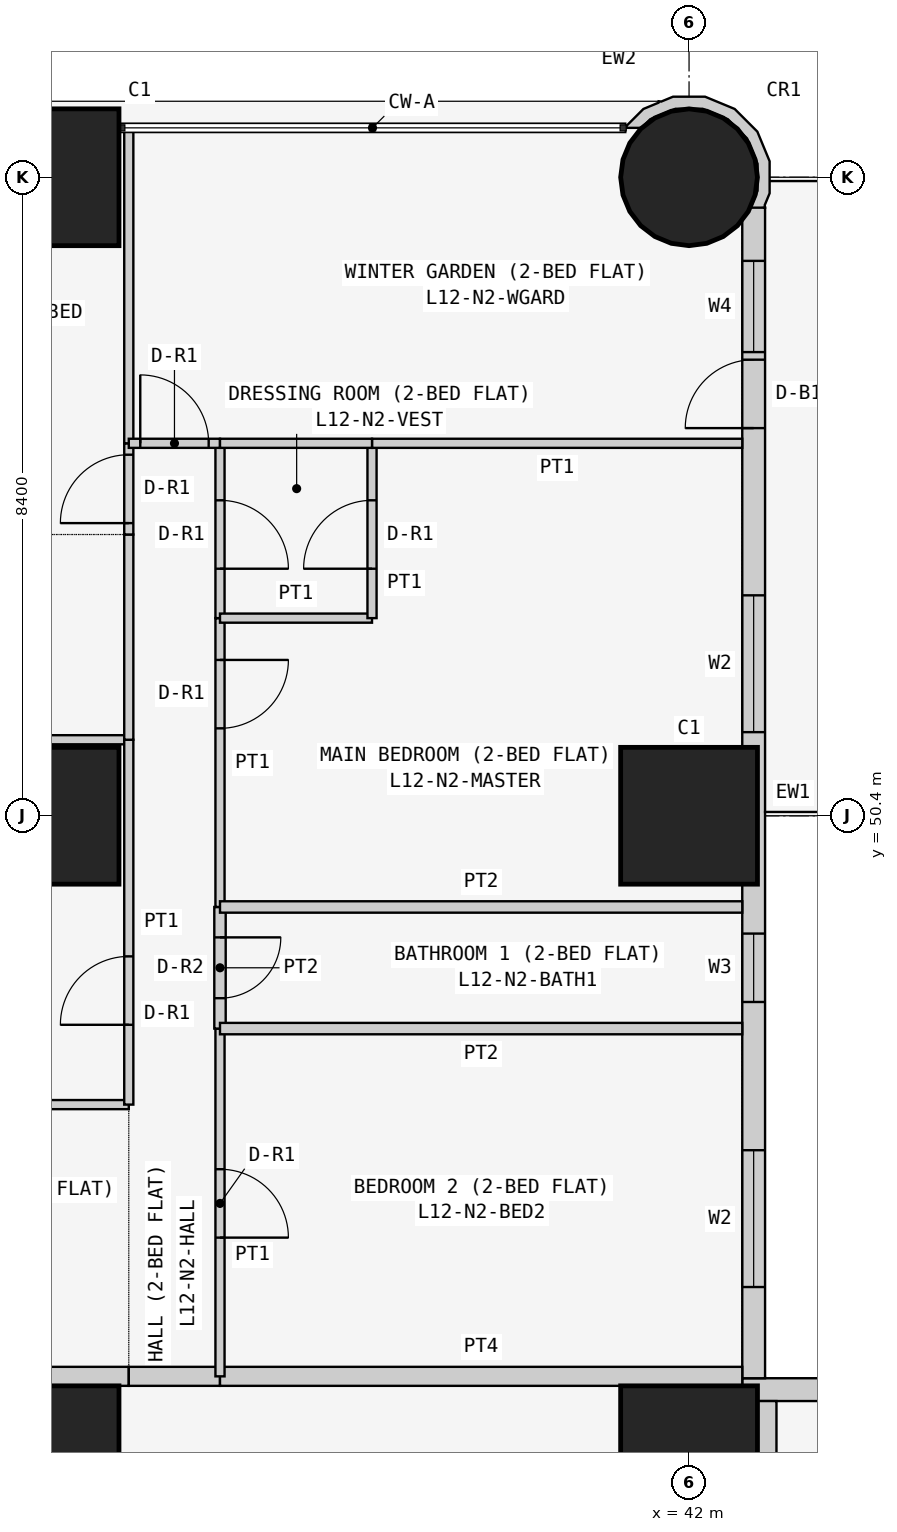
"""IFC4 building model, lengths in metres.
Left out: names, types, materials, properties, quantities, classifications, styles, units other than length and angle.
Written with IfcOpenShell. Run it as: python <this file> out.ifc"""

import sys

from ifc_helpers import new_model, si_unit, direction, frame, frame_2d, origin, origin_2d, place, context, subcontext, project, spatial, polyline, rectangle, circle, outline, extrude, element, fill, save


model = new_model("IFC4")
c1 = context("Model", 3, precision=1e-05, world=origin(), true_north=direction((0.0, 1.0)))
c2 = subcontext(c1, "Body", "Model", "MODEL_VIEW")
j1 = project(units=[si_unit("LENGTHUNIT", "METRE"), si_unit("PLANEANGLEUNIT", "RADIAN")], contexts=[c1])
p1 = place(None, origin())
s1 = spatial("IfcSite", under=j1, at=p1, CompositionType="ELEMENT")
p2 = place(p1, origin())
s2 = spatial("IfcBuilding", under=s1, at=p2, CompositionType="ELEMENT")
p3 = place(p2, frame((0.0, 0.0, 52.5)))
s3 = spatial("IfcBuildingStorey", under=s2, at=p3, CompositionType="ELEMENT", Elevation=52.5)
for number, where, z_axis, x_axis in (
    (1, (33.6, 42.0, 0.0), (0.0, 0.0, 1.0), (1.0, 0.0, 0.0)),
    (2, (33.6, 50.4, 0.0), (0.0, 0.0, 1.0), (1.0, 0.0, 0.0)),
    (3, (33.6, 58.8, 0.0), (0.0, 0.0, 1.0), (1.0, 0.0, 0.0)),
    (4, (42.0, 42.0, 0.0), (0.0, 0.0, 1.0), (1.0, 0.0, 0.0)),
    (5, (42.0, 50.4, 0.0), (0.0, 0.0, 1.0), (1.0, 0.0, 0.0)),
):
    element("IfcColumn", number, at=place(p3, frame(where, z_axis=z_axis, x_axis=x_axis)), inside=s3, PredefinedType="COLUMN", context=c2, shape_type="SweptSolid", body=[
        extrude(rectangle(XDim=1.8, YDim=1.8, at=origin_2d()), origin(), (0.0, 0.0, 1.0), 3.6),
    ])
p4 = place(p3, frame((42.0, 58.8, 0.0), z_axis=(0.0, 0.0, 1.0), x_axis=(1.0, 0.0, 0.0)))
e6 = element("IfcColumn", 6, at=p4, inside=s3, PredefinedType="COLUMN", context=c2, shape_type="SweptSolid", body=[
    extrude(circle(Radius=0.9, at=origin_2d()), origin(), (0.0, 0.0, 1.0), 3.6),
])
p5 = place(p3, frame((58.4, 42.85, 0.0), z_axis=(0.0, 0.0, 1.0), x_axis=(-1.0, 0.0, 0.0)))
e7 = element("IfcWall", 7, at=p5, inside=s3, PredefinedType="SOLIDWALL", context=c2, shape_type="SweptSolid", body=[
    extrude(rectangle(XDim=15.7, YDim=0.3, at=frame_2d((7.85, 0.0))), origin(), (0.0, 0.0, 1.0), 3.45),
])
p6 = place(p5, frame((12.4, 0.0, 0.9)))
e8 = element("IfcOpeningElement", 8, at=p6, cuts=e7, PredefinedType="OPENING", context=c2, shape_type="SweptSolid", body=[
    extrude(rectangle(XDim=1.8, YDim=1.5, at=frame_2d((0.9, 0.75))), frame((0.0, 0.16, 0.0), z_axis=(0.0, -1.0, 0.0), x_axis=(1.0, 0.0, 0.0)), (0.0, 0.0, 1.0), 0.32),
])
p7 = place(p5, frame((9.55, 0.0, 1.5)))
e9 = element("IfcOpeningElement", 9, at=p7, cuts=e7, PredefinedType="OPENING", context=c2, shape_type="SweptSolid", body=[
    extrude(rectangle(XDim=0.9, YDim=0.7, at=frame_2d((0.45, 0.35))), frame((0.0, 0.16, 0.0), z_axis=(0.0, -1.0, 0.0), x_axis=(1.0, 0.0, 0.0)), (0.0, 0.0, 1.0), 0.32),
])
p8 = place(p5, frame((5.1, 0.0, 0.9)))
e10 = element("IfcOpeningElement", 10, at=p8, cuts=e7, PredefinedType="OPENING", context=c2, shape_type="SweptSolid", body=[
    extrude(rectangle(XDim=1.8, YDim=1.5, at=frame_2d((0.9, 0.75))), frame((0.0, 0.16, 0.0), z_axis=(0.0, -1.0, 0.0), x_axis=(1.0, 0.0, 0.0)), (0.0, 0.0, 1.0), 0.32),
])
p9 = place(p5, frame((2.0, 0.0, 0.0)))
e11 = element("IfcOpeningElement", 11, at=p9, cuts=e7, PredefinedType="OPENING", context=c2, shape_type="SweptSolid", body=[
    extrude(rectangle(XDim=0.9, YDim=2.4, at=frame_2d((0.45, 1.2))), frame((0.0, 0.16, 0.0), z_axis=(0.0, -1.0, 0.0), x_axis=(1.0, 0.0, 0.0)), (0.0, 0.0, 1.0), 0.32),
])
p10 = place(p5, frame((0.7, 0.0, 0.9)))
e12 = element("IfcOpeningElement", 12, at=p10, cuts=e7, PredefinedType="OPENING", context=c2, shape_type="SweptSolid", body=[
    extrude(rectangle(XDim=1.2, YDim=1.5, at=frame_2d((0.6, 0.75))), frame((0.0, 0.16, 0.0), z_axis=(0.0, -1.0, 0.0), x_axis=(1.0, 0.0, 0.0)), (0.0, 0.0, 1.0), 0.32),
])
p11 = place(p3, frame((42.85, 43.0, 0.0), z_axis=(0.0, 0.0, 1.0), x_axis=(0.0, 1.0, 0.0)))
e13 = element("IfcWall", 13, at=p11, inside=s3, PredefinedType="SOLIDWALL", context=c2, shape_type="SweptSolid", body=[
    extrude(rectangle(XDim=15.4, YDim=0.3, at=frame_2d((7.7, 0.0))), origin(), (0.0, 0.0, 1.0), 3.45),
])
p12 = place(p11, frame((1.2, 0.0, 0.9)))
e14 = element("IfcOpeningElement", 14, at=p12, cuts=e13, PredefinedType="OPENING", context=c2, shape_type="SweptSolid", body=[
    extrude(rectangle(XDim=1.8, YDim=1.5, at=frame_2d((0.9, 0.75))), frame((0.0, 0.16, 0.0), z_axis=(0.0, -1.0, 0.0), x_axis=(1.0, 0.0, 0.0)), (0.0, 0.0, 1.0), 0.32),
])
p13 = place(p11, frame((4.95, 0.0, 1.5)))
e15 = element("IfcOpeningElement", 15, at=p13, cuts=e13, PredefinedType="OPENING", context=c2, shape_type="SweptSolid", body=[
    extrude(rectangle(XDim=0.9, YDim=0.7, at=frame_2d((0.45, 0.35))), frame((0.0, 0.16, 0.0), z_axis=(0.0, -1.0, 0.0), x_axis=(1.0, 0.0, 0.0)), (0.0, 0.0, 1.0), 0.32),
])
p14 = place(p11, frame((8.5, 0.0, 0.9)))
e16 = element("IfcOpeningElement", 16, at=p14, cuts=e13, PredefinedType="OPENING", context=c2, shape_type="SweptSolid", body=[
    extrude(rectangle(XDim=1.8, YDim=1.5, at=frame_2d((0.9, 0.75))), frame((0.0, 0.16, 0.0), z_axis=(0.0, -1.0, 0.0), x_axis=(1.0, 0.0, 0.0)), (0.0, 0.0, 1.0), 0.32),
])
p15 = place(p11, frame((12.5, 0.0, 0.0)))
e17 = element("IfcOpeningElement", 17, at=p15, cuts=e13, PredefinedType="OPENING", context=c2, shape_type="SweptSolid", body=[
    extrude(rectangle(XDim=0.9, YDim=2.4, at=frame_2d((0.45, 1.2))), frame((0.0, 0.16, 0.0), z_axis=(0.0, -1.0, 0.0), x_axis=(1.0, 0.0, 0.0)), (0.0, 0.0, 1.0), 0.32),
])
p16 = place(p11, frame((13.5, 0.0, 0.9)))
e18 = element("IfcOpeningElement", 18, at=p16, cuts=e13, PredefinedType="OPENING", context=c2, shape_type="SweptSolid", body=[
    extrude(rectangle(XDim=1.2, YDim=1.5, at=frame_2d((0.6, 0.75))), frame((0.0, 0.16, 0.0), z_axis=(0.0, -1.0, 0.0), x_axis=(1.0, 0.0, 0.0)), (0.0, 0.0, 1.0), 0.32),
])
p17 = place(p3, frame((42.91, 58.436, 0.0), z_axis=(0.0, 0.0, 1.0), x_axis=(0.377204953059, 0.926129809145, 0.0)))
e19 = element("IfcWall", 19, at=p17, inside=s3, PredefinedType="SOLIDWALL", context=c2, shape_type="SweptSolid", body=[
    extrude(outline(polyline([(0.769, 1.728), (0.75, 1.723), (0.6, 1.875), (0.295, 2.004), (0.281, 1.998), (0.36, 1.803), (0.509, 1.741), (0.761, 1.486), (0.896, 1.154), (0.894, 0.795), (0.755, 0.465), (0.5, 0.213), (0.168, 0.078), (-0.1, 0.08), (0.001, -0.097), (0.03, -0.08), (0.198, -0.081), (0.589, 0.078), (0.889, 0.374), (1.052, 0.763), (1.055, 1.185), (0.896, 1.575), (0.778, 1.695), (0.769, 1.728)])), origin(), (0.0, 0.0, 1.0), 3.45),
])
p18 = place(p3, frame((29.4, 43.025, 0.0), z_axis=(0.0, 0.0, 1.0), x_axis=(1.0, 0.0, 0.0)))
e20 = element("IfcWall", 20, at=p18, inside=s3, PredefinedType="PARTITIONING", context=c2, shape_type="SweptSolid", body=[
    extrude(rectangle(XDim=5.229, YDim=0.25, at=frame_2d((2.615, 0.0))), origin(), (0.0, 0.0, 1.0), 3.45),
])
p19 = place(p18, frame((2.1, 0.0, 0.0)))
e21 = element("IfcOpeningElement", 21, at=p19, cuts=e20, PredefinedType="OPENING", context=c2, shape_type="SweptSolid", body=[
    extrude(rectangle(XDim=1.0, YDim=2.1, at=frame_2d((0.5, 1.05))), frame((0.0, 0.135, 0.0), z_axis=(0.0, -1.0, 0.0), x_axis=(1.0, 0.0, 0.0)), (0.0, 0.0, 1.0), 0.27),
])
p20 = place(p3, frame((34.629, 43.025, 0.0), z_axis=(0.0, 0.0, 1.0), x_axis=(1.0, 0.0, 0.0)))
e22 = element("IfcWall", 22, at=p20, inside=s3, PredefinedType="PARTITIONING", context=c2, shape_type="SweptSolid", body=[
    extrude(rectangle(XDim=1.2, YDim=0.25, at=frame_2d((0.6, 0.0))), origin(), (0.0, 0.0, 1.0), 3.45),
])
for number, where, z_axis, x_axis in (
    (23, (35.829, 43.025, 0.0), (0.0, 0.0, 1.0), (1.0, 0.0, 0.0)),
    (24, (43.025, 42.7, 0.0), (0.0, 0.0, 1.0), (0.0, -1.0, 0.0)),
):
    element("IfcWall", number, at=place(p3, frame(where, z_axis=z_axis, x_axis=x_axis)), inside=s3, PredefinedType="PARTITIONING", context=c2, shape_type="SweptSolid", body=[
        extrude(rectangle(XDim=6.871, YDim=0.25, at=frame_2d((3.436, 0.0))), origin(), (0.0, 0.0, 1.0), 3.45),
    ])
for number, where, z_axis, x_axis in (
    (25, (29.4, 46.6, 0.0), (0.0, 0.0, 1.0), (1.0, 0.0, 0.0)),
    (26, (29.4, 51.4, 0.0), (0.0, 0.0, 1.0), (1.0, 0.0, 0.0)),
):
    element("IfcWall", number, at=place(p3, frame(where, z_axis=z_axis, x_axis=x_axis)), inside=s3, PredefinedType="PARTITIONING", context=c2, shape_type="SweptSolid", body=[
        extrude(rectangle(XDim=5.229, YDim=0.12, at=frame_2d((2.615, 0.0))), origin(), (0.0, 0.0, 1.0), 3.45),
    ])
p21 = place(p3, frame((34.629, 51.4, 0.0), z_axis=(0.0, 0.0, 1.0), x_axis=(0.0, -1.0, 0.0)))
e27 = element("IfcWall", 27, at=p21, inside=s3, PredefinedType="PARTITIONING", context=c2, shape_type="SweptSolid", body=[
    extrude(rectangle(XDim=4.8, YDim=0.12, at=frame_2d((2.4, 0.0))), origin(), (0.0, 0.0, 1.0), 3.45),
])
p22 = place(p21, frame((2.85, 0.0, 0.0)))
e28 = element("IfcOpeningElement", 28, at=p22, cuts=e27, PredefinedType="OPENING", context=c2, shape_type="SweptSolid", body=[
    extrude(rectangle(XDim=0.9, YDim=2.1, at=frame_2d((0.45, 1.05))), frame((0.0, 0.07, 0.0), z_axis=(0.0, -1.0, 0.0), x_axis=(1.0, 0.0, 0.0)), (0.0, 0.0, 1.0), 0.14),
])
p23 = place(p3, frame((34.629, 54.1, 0.0), z_axis=(0.0, 0.0, 1.0), x_axis=(0.0, -1.0, 0.0)))
e29 = element("IfcWall", 29, at=p23, inside=s3, PredefinedType="PARTITIONING", context=c2, shape_type="SweptSolid", body=[
    extrude(rectangle(XDim=2.7, YDim=0.12, at=frame_2d((1.35, 0.0))), origin(), (0.0, 0.0, 1.0), 3.45),
])
p24 = place(p3, frame((34.629, 55.3, 0.0), z_axis=(0.0, 0.0, 1.0), x_axis=(0.0, -1.0, 0.0)))
e30 = element("IfcWall", 30, at=p24, inside=s3, PredefinedType="PARTITIONING", context=c2, shape_type="SweptSolid", body=[
    extrude(rectangle(XDim=1.2, YDim=0.12, at=frame_2d((0.6, 0.0))), origin(), (0.0, 0.0, 1.0), 3.45),
])
p25 = place(p24, frame((0.15, 0.0, 0.0)))
e31 = element("IfcOpeningElement", 31, at=p25, cuts=e30, PredefinedType="OPENING", context=c2, shape_type="SweptSolid", body=[
    extrude(rectangle(XDim=0.9, YDim=2.1, at=frame_2d((0.45, 1.05))), frame((0.0, 0.07, 0.0), z_axis=(0.0, -1.0, 0.0), x_axis=(1.0, 0.0, 0.0)), (0.0, 0.0, 1.0), 0.14),
])
p26 = place(p3, frame((34.629, 59.45, 0.0), z_axis=(0.0, 0.0, 1.0), x_axis=(0.0, -1.0, 0.0)))
e32 = element("IfcWall", 32, at=p26, inside=s3, PredefinedType="PARTITIONING", context=c2, shape_type="SweptSolid", body=[
    extrude(rectangle(XDim=4.15, YDim=0.12, at=frame_2d((2.075, 0.0))), origin(), (0.0, 0.0, 1.0), 3.45),
])
p27 = place(p3, frame((35.829, 47.6, 0.0), z_axis=(0.0, 0.0, 1.0), x_axis=(0.0, -1.0, 0.0)))
e33 = element("IfcWall", 33, at=p27, inside=s3, PredefinedType="PARTITIONING", context=c2, shape_type="SweptSolid", body=[
    extrude(rectangle(XDim=4.575, YDim=0.12, at=frame_2d((2.288, 0.0))), origin(), (0.0, 0.0, 1.0), 3.45),
])
p28 = place(p27, frame((1.85, 0.0, 0.0)))
e34 = element("IfcOpeningElement", 34, at=p28, cuts=e33, PredefinedType="OPENING", context=c2, shape_type="SweptSolid", body=[
    extrude(rectangle(XDim=0.9, YDim=2.1, at=frame_2d((0.45, 1.05))), frame((0.0, 0.07, 0.0), z_axis=(0.0, -1.0, 0.0), x_axis=(1.0, 0.0, 0.0)), (0.0, 0.0, 1.0), 0.14),
])
p29 = place(p3, frame((35.829, 49.2, 0.0), z_axis=(0.0, 0.0, 1.0), x_axis=(0.0, -1.0, 0.0)))
e35 = element("IfcWall", 35, at=p29, inside=s3, PredefinedType="PARTITIONING", context=c2, shape_type="SweptSolid", body=[
    extrude(rectangle(XDim=1.6, YDim=0.15, at=frame_2d((0.8, 0.0))), origin(), (0.0, 0.0, 1.0), 3.45),
])
p30 = place(p29, frame((0.4, 0.0, 0.0)))
e36 = element("IfcOpeningElement", 36, at=p30, cuts=e35, PredefinedType="OPENING", context=c2, shape_type="SweptSolid", body=[
    extrude(rectangle(XDim=0.8, YDim=2.1, at=frame_2d((0.4, 1.05))), frame((0.0, 0.085, 0.0), z_axis=(0.0, -1.0, 0.0), x_axis=(1.0, 0.0, 0.0)), (0.0, 0.0, 1.0), 0.17),
])
p31 = place(p3, frame((35.829, 53.0, 0.0), z_axis=(0.0, 0.0, 1.0), x_axis=(0.0, -1.0, 0.0)))
e37 = element("IfcWall", 37, at=p31, inside=s3, PredefinedType="PARTITIONING", context=c2, shape_type="SweptSolid", body=[
    extrude(rectangle(XDim=3.8, YDim=0.12, at=frame_2d((1.9, 0.0))), origin(), (0.0, 0.0, 1.0), 3.45),
])
p32 = place(p31, frame((0.55, 0.0, 0.0)))
e38 = element("IfcOpeningElement", 38, at=p32, cuts=e37, PredefinedType="OPENING", context=c2, shape_type="SweptSolid", body=[
    extrude(rectangle(XDim=0.9, YDim=2.1, at=frame_2d((0.45, 1.05))), frame((0.0, 0.07, 0.0), z_axis=(0.0, -1.0, 0.0), x_axis=(1.0, 0.0, 0.0)), (0.0, 0.0, 1.0), 0.14),
])
p33 = place(p3, frame((35.829, 55.3, 0.0), z_axis=(0.0, 0.0, 1.0), x_axis=(0.0, -1.0, 0.0)))
e39 = element("IfcWall", 39, at=p33, inside=s3, PredefinedType="PARTITIONING", context=c2, shape_type="SweptSolid", body=[
    extrude(rectangle(XDim=2.3, YDim=0.12, at=frame_2d((1.15, 0.0))), origin(), (0.0, 0.0, 1.0), 3.45),
])
p34 = place(p33, frame((0.75, 0.0, 0.0)))
e40 = element("IfcOpeningElement", 40, at=p34, cuts=e39, PredefinedType="OPENING", context=c2, shape_type="SweptSolid", body=[
    extrude(rectangle(XDim=0.9, YDim=2.1, at=frame_2d((0.45, 1.05))), frame((0.0, 0.07, 0.0), z_axis=(0.0, -1.0, 0.0), x_axis=(1.0, 0.0, 0.0)), (0.0, 0.0, 1.0), 0.14),
])
p35 = place(p3, frame((34.629, 55.3, 0.0), z_axis=(0.0, 0.0, 1.0), x_axis=(1.0, 0.0, 0.0)))
e41 = element("IfcWall", 41, at=p35, inside=s3, PredefinedType="PARTITIONING", context=c2, shape_type="SweptSolid", body=[
    extrude(rectangle(XDim=1.2, YDim=0.12, at=frame_2d((0.6, 0.0))), origin(), (0.0, 0.0, 1.0), 3.45),
])
p36 = place(p35, frame((0.151, 0.0, 0.0)))
e42 = element("IfcOpeningElement", 42, at=p36, cuts=e41, PredefinedType="OPENING", context=c2, shape_type="SweptSolid", body=[
    extrude(rectangle(XDim=0.9, YDim=2.1, at=frame_2d((0.45, 1.05))), frame((0.0, 0.07, 0.0), z_axis=(0.0, -1.0, 0.0), x_axis=(1.0, 0.0, 0.0)), (0.0, 0.0, 1.0), 0.14),
])
for number, where, z_axis, x_axis in (
    (43, (35.829, 47.6, 0.0), (0.0, 0.0, 1.0), (1.0, 0.0, 0.0)),
    (44, (35.829, 49.2, 0.0), (0.0, 0.0, 1.0), (1.0, 0.0, 0.0)),
):
    element("IfcWall", number, at=place(p3, frame(where, z_axis=z_axis, x_axis=x_axis)), inside=s3, PredefinedType="PARTITIONING", context=c2, shape_type="SweptSolid", body=[
        extrude(rectangle(XDim=6.871, YDim=0.15, at=frame_2d((3.436, 0.0))), origin(), (0.0, 0.0, 1.0), 3.45),
    ])
p37 = place(p3, frame((35.829, 53.0, 0.0), z_axis=(0.0, 0.0, 1.0), x_axis=(1.0, 0.0, 0.0)))
e45 = element("IfcWall", 45, at=p37, inside=s3, PredefinedType="PARTITIONING", context=c2, shape_type="SweptSolid", body=[
    extrude(rectangle(XDim=2.0, YDim=0.12, at=frame_2d((1.0, 0.0))), origin(), (0.0, 0.0, 1.0), 3.45),
])
p38 = place(p3, frame((37.829, 53.0, 0.0), z_axis=(0.0, 0.0, 1.0), x_axis=(0.0, 1.0, 0.0)))
e46 = element("IfcWall", 46, at=p38, inside=s3, PredefinedType="PARTITIONING", context=c2, shape_type="SweptSolid", body=[
    extrude(rectangle(XDim=2.3, YDim=0.12, at=frame_2d((1.15, 0.0))), origin(), (0.0, 0.0, 1.0), 2.848),
])
p39 = place(p38, frame((0.65, 0.0, 0.0)))
e47 = element("IfcOpeningElement", 47, at=p39, cuts=e46, PredefinedType="OPENING", context=c2, shape_type="SweptSolid", body=[
    extrude(rectangle(XDim=0.9, YDim=2.1, at=frame_2d((0.45, 1.05))), frame((0.0, 0.07, 0.0), z_axis=(0.0, -1.0, 0.0), x_axis=(1.0, 0.0, 0.0)), (0.0, 0.0, 1.0), 0.14),
])
p40 = place(p3, frame((37.829, 55.3, 0.0), z_axis=(0.0, 0.0, 1.0), x_axis=(1.0, 0.0, 0.0)))
e48 = element("IfcWall", 48, at=p40, inside=s3, PredefinedType="PARTITIONING", context=c2, shape_type="SweptSolid", body=[
    extrude(rectangle(XDim=4.871, YDim=0.12, at=frame_2d((2.436, 0.0))), origin(), (0.0, 0.0, 1.0), 3.45),
])
p41 = place(p3, frame((35.829, 55.3, 0.0), z_axis=(0.0, 0.0, 1.0), x_axis=(1.0, 0.0, 0.0)))
e49 = element("IfcWall", 49, at=p41, inside=s3, PredefinedType="PARTITIONING", context=c2, shape_type="SweptSolid", body=[
    extrude(rectangle(XDim=2.0, YDim=0.12, at=frame_2d((1.0, 0.0))), origin(), (0.0, 0.0, 1.0), 3.45),
])
p42 = place(p12, origin())
e50 = element("IfcWindow", 50, at=p42, inside=s3, PartitioningType="SINGLE_PANEL", PredefinedType="WINDOW", context=c2, shape_type="SweptSolid", body=[
    extrude(rectangle(XDim=1.8, YDim=1.5, at=frame_2d((0.9, 0.75))), frame((0.0, 0.03, 0.0), z_axis=(0.0, -1.0, 0.0), x_axis=(1.0, 0.0, 0.0)), (0.0, 0.0, 1.0), 0.06),
])
fill(e14, e50)
p43 = place(p13, origin())
e51 = element("IfcWindow", 51, at=p43, inside=s3, PartitioningType="SINGLE_PANEL", PredefinedType="WINDOW", context=c2, shape_type="SweptSolid", body=[
    extrude(rectangle(XDim=0.9, YDim=0.7, at=frame_2d((0.45, 0.35))), frame((0.0, 0.03, 0.0), z_axis=(0.0, -1.0, 0.0), x_axis=(1.0, 0.0, 0.0)), (0.0, 0.0, 1.0), 0.06),
])
fill(e15, e51)
p44 = place(p14, origin())
e52 = element("IfcWindow", 52, at=p44, inside=s3, PartitioningType="SINGLE_PANEL", PredefinedType="WINDOW", context=c2, shape_type="SweptSolid", body=[
    extrude(rectangle(XDim=1.8, YDim=1.5, at=frame_2d((0.9, 0.75))), frame((0.0, 0.03, 0.0), z_axis=(0.0, -1.0, 0.0), x_axis=(1.0, 0.0, 0.0)), (0.0, 0.0, 1.0), 0.06),
])
fill(e16, e52)
p45 = place(p15, origin())
e53 = element("IfcDoor", 53, at=p45, inside=s3, OperationType="SINGLE_SWING_LEFT", PredefinedType="DOOR", context=c2, shape_type="SweptSolid", body=[
    extrude(rectangle(XDim=0.9, YDim=2.4, at=frame_2d((0.45, 1.2))), frame((0.0, 0.025, 0.0), z_axis=(0.0, -1.0, 0.0), x_axis=(1.0, 0.0, 0.0)), (0.0, 0.0, 1.0), 0.05),
])
fill(e17, e53)
p46 = place(p16, origin())
e54 = element("IfcWindow", 54, at=p46, inside=s3, PartitioningType="SINGLE_PANEL", PredefinedType="WINDOW", context=c2, shape_type="SweptSolid", body=[
    extrude(rectangle(XDim=1.2, YDim=1.5, at=frame_2d((0.6, 0.75))), frame((0.0, 0.03, 0.0), z_axis=(0.0, -1.0, 0.0), x_axis=(1.0, 0.0, 0.0)), (0.0, 0.0, 1.0), 0.06),
])
fill(e18, e54)
p47 = place(p22, frame((0.9, 0.0, 0.0), z_axis=(0.0, 0.0, 1.0), x_axis=(-1.0, 0.0, 0.0)))
e55 = element("IfcDoor", 55, at=p47, inside=s3, OperationType="SINGLE_SWING_LEFT", PredefinedType="DOOR", context=c2, shape_type="SweptSolid", body=[
    extrude(rectangle(XDim=0.9, YDim=2.1, at=frame_2d((0.45, 1.05))), frame((0.0, 0.025, 0.0), z_axis=(0.0, -1.0, 0.0), x_axis=(1.0, 0.0, 0.0)), (0.0, 0.0, 1.0), 0.05),
])
fill(e28, e55)
p48 = place(p25, frame((0.9, 0.0, 0.0), z_axis=(0.0, 0.0, 1.0), x_axis=(-1.0, 0.0, 0.0)))
e56 = element("IfcDoor", 56, at=p48, inside=s3, OperationType="SINGLE_SWING_LEFT", PredefinedType="DOOR", context=c2, shape_type="SweptSolid", body=[
    extrude(rectangle(XDim=0.9, YDim=2.1, at=frame_2d((0.45, 1.05))), frame((0.0, 0.025, 0.0), z_axis=(0.0, -1.0, 0.0), x_axis=(1.0, 0.0, 0.0)), (0.0, 0.0, 1.0), 0.05),
])
fill(e31, e56)
p49 = place(p28, origin())
e57 = element("IfcDoor", 57, at=p49, inside=s3, OperationType="SINGLE_SWING_RIGHT", PredefinedType="DOOR", context=c2, shape_type="SweptSolid", body=[
    extrude(rectangle(XDim=0.9, YDim=2.1, at=frame_2d((0.45, 1.05))), frame((0.0, 0.025, 0.0), z_axis=(0.0, -1.0, 0.0), x_axis=(1.0, 0.0, 0.0)), (0.0, 0.0, 1.0), 0.05),
])
fill(e34, e57)
p50 = place(p30, origin())
e58 = element("IfcDoor", 58, at=p50, inside=s3, OperationType="SINGLE_SWING_LEFT", PredefinedType="DOOR", context=c2, shape_type="SweptSolid", body=[
    extrude(rectangle(XDim=0.8, YDim=2.1, at=frame_2d((0.4, 1.05))), frame((0.0, 0.025, 0.0), z_axis=(0.0, -1.0, 0.0), x_axis=(1.0, 0.0, 0.0)), (0.0, 0.0, 1.0), 0.05),
])
fill(e36, e58)
p51 = place(p32, origin())
e59 = element("IfcDoor", 59, at=p51, inside=s3, OperationType="SINGLE_SWING_LEFT", PredefinedType="DOOR", context=c2, shape_type="SweptSolid", body=[
    extrude(rectangle(XDim=0.9, YDim=2.1, at=frame_2d((0.45, 1.05))), frame((0.0, 0.025, 0.0), z_axis=(0.0, -1.0, 0.0), x_axis=(1.0, 0.0, 0.0)), (0.0, 0.0, 1.0), 0.05),
])
fill(e38, e59)
p52 = place(p34, origin())
e60 = element("IfcDoor", 60, at=p52, inside=s3, OperationType="SINGLE_SWING_RIGHT", PredefinedType="DOOR", context=c2, shape_type="SweptSolid", body=[
    extrude(rectangle(XDim=0.9, YDim=2.1, at=frame_2d((0.45, 1.05))), frame((0.0, 0.025, 0.0), z_axis=(0.0, -1.0, 0.0), x_axis=(1.0, 0.0, 0.0)), (0.0, 0.0, 1.0), 0.05),
])
fill(e40, e60)
p53 = place(p39, origin())
e61 = element("IfcDoor", 61, at=p53, inside=s3, OperationType="SINGLE_SWING_LEFT", PredefinedType="DOOR", context=c2, shape_type="SweptSolid", body=[
    extrude(rectangle(XDim=0.9, YDim=2.1, at=frame_2d((0.45, 1.05))), frame((0.0, 0.025, 0.0), z_axis=(0.0, -1.0, 0.0), x_axis=(1.0, 0.0, 0.0)), (0.0, 0.0, 1.0), 0.05),
])
fill(e47, e61)
p54 = place(p36, origin())
e62 = element("IfcDoor", 62, at=p54, inside=s3, OperationType="SINGLE_SWING_LEFT", PredefinedType="DOOR", context=c2, shape_type="SweptSolid", body=[
    extrude(rectangle(XDim=0.9, YDim=2.1, at=frame_2d((0.45, 1.05))), frame((0.0, 0.025, 0.0), z_axis=(0.0, -1.0, 0.0), x_axis=(1.0, 0.0, 0.0)), (0.0, 0.0, 1.0), 0.05),
])
fill(e42, e62)
save(model, sys.argv[1])
